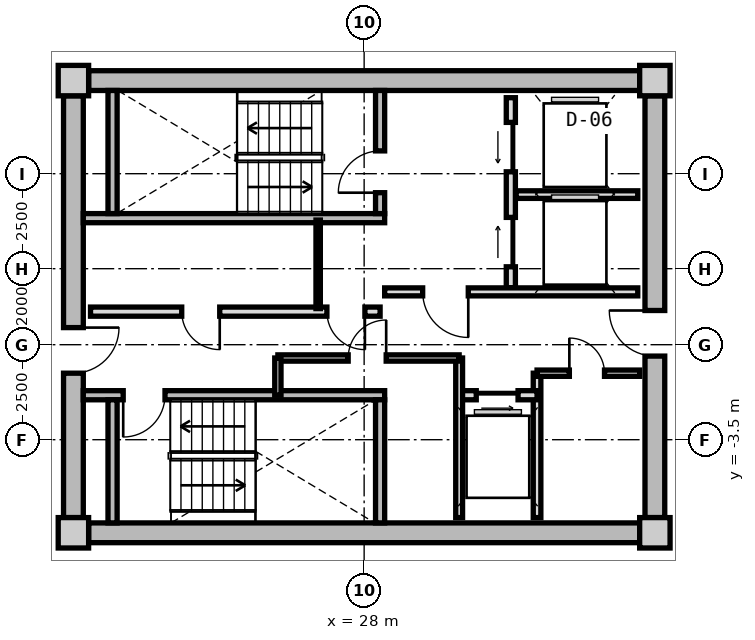
"""IFC4 building model, lengths in metres.
Left out: names, types, materials, properties, quantities, classifications, styles, units other than length and angle.
Written with IfcOpenShell. Run it as: python <this file> out.ifc"""

import sys

from ifc_helpers import new_model, si_unit, direction, frame, frame_2d, origin, origin_2d, place, context, subcontext, project, spatial, rectangle, extrude, source, transform, mapped, element, fill, save


model = new_model("IFC4")
c1 = context("Model", 3, precision=1e-05, world=origin(), true_north=direction((0.0, 1.0)))
c2 = subcontext(c1, "Body", "Model", "MODEL_VIEW")
j1 = project(units=[si_unit("LENGTHUNIT", "METRE"), si_unit("PLANEANGLEUNIT", "RADIAN")], contexts=[c1])
p1 = place(None, origin())
s1 = spatial("IfcSite", under=j1, at=p1, CompositionType="ELEMENT")
p2 = place(p1, origin())
s2 = spatial("IfcBuilding", under=s1, at=p2, CompositionType="ELEMENT")
p3 = place(p2, frame((0.0, 0.0, 235.25)))
s3 = spatial("IfcBuildingStorey", under=s2, at=p3, CompositionType="ELEMENT", Elevation=235.25)
m1 = source(origin(), c2, "Body", "SweptSolid", [
    extrude(rectangle(XDim=0.8, YDim=0.8, at=origin_2d()), origin(), (0.0, 0.0, 1.0), 3.05),
])
for number, where, z_axis, x_axis in (
    (1, (20.35, -5.95, 0.0), (0.0, 0.0, 1.0), (1.0, 0.0, 0.0)),
    (2, (35.65, -5.95, 0.0), (0.0, 0.0, 1.0), (1.0, 0.0, 0.0)),
    (3, (35.65, 5.95, 0.0), (0.0, 0.0, 1.0), (1.0, 0.0, 0.0)),
    (4, (20.35, 5.95, 0.0), (0.0, 0.0, 1.0), (1.0, 0.0, 0.0)),
):
    element("IfcColumn", number, at=place(p3, frame(where, z_axis=z_axis, x_axis=x_axis)), inside=s3, PredefinedType="COLUMN", context=c2, shape_type="MappedRepresentation", body=[
        mapped(m1, transform((0.0, 0.0, 0.0), x_axis=(1.0, 0.0, 0.0), y_axis=(0.0, 1.0, 0.0), z_axis=(0.0, 0.0, 1.0), scale=1.0)),
    ])
m2 = source(origin(), c2, "Body", "SweptSolid", [
    extrude(rectangle(XDim=14.5, YDim=0.52, at=frame_2d((7.25, 0.0))), origin(), (0.0, 0.0, 1.0), 2.81),
])
for number, where, z_axis, x_axis in (
    (5, (20.75, 5.95, 0.0), (0.0, 0.0, 1.0), (1.0, 0.0, 0.0)),
    (6, (35.25, -5.95, 0.0), (0.0, 0.0, 1.0), (-1.0, 0.0, 0.0)),
):
    element("IfcWall", number, at=place(p3, frame(where, z_axis=z_axis, x_axis=x_axis)), inside=s3, PredefinedType="SHEAR", context=c2, shape_type="MappedRepresentation", body=[
        mapped(m2, transform((0.0, 0.0, 0.0), x_axis=(1.0, 0.0, 0.0), y_axis=(0.0, 1.0, 0.0), z_axis=(0.0, 0.0, 1.0), scale=1.0)),
    ])
m3 = source(origin(), c2, "Body", "SweptSolid", [
    extrude(rectangle(XDim=11.1, YDim=0.52, at=frame_2d((5.55, 0.0))), origin(), (0.0, 0.0, 1.0), 2.81),
])
p4 = place(p3, frame((20.35, -5.55, 0.0), z_axis=(0.0, 0.0, 1.0), x_axis=(0.0, 1.0, 0.0)))
e7 = element("IfcWall", 7, at=p4, inside=s3, PredefinedType="SHEAR", context=c2, shape_type="MappedRepresentation", body=[
    mapped(m3, transform((0.0, 0.0, 0.0), x_axis=(1.0, 0.0, 0.0), y_axis=(0.0, 1.0, 0.0), z_axis=(0.0, 0.0, 1.0), scale=1.0)),
])
p5 = place(p4, frame((3.8, 0.0, 0.0)))
e8 = element("IfcOpeningElement", 8, at=p5, cuts=e7, PredefinedType="OPENING", context=c2, shape_type="SweptSolid", body=[
    extrude(rectangle(XDim=1.2, YDim=2.15, at=frame_2d((0.6, 1.075))), frame((0.0, 0.27, 0.0), z_axis=(0.0, -1.0, 0.0), x_axis=(1.0, 0.0, 0.0)), (0.0, 0.0, 1.0), 0.54),
])
p6 = place(p3, frame((35.65, 5.55, 0.0), z_axis=(0.0, 0.0, 1.0), x_axis=(0.0, -1.0, 0.0)))
e9 = element("IfcWall", 9, at=p6, inside=s3, PredefinedType="SHEAR", context=c2, shape_type="MappedRepresentation", body=[
    mapped(m3, transform((0.0, 0.0, 0.0), x_axis=(1.0, 0.0, 0.0), y_axis=(0.0, 1.0, 0.0), z_axis=(0.0, 0.0, 1.0), scale=1.0)),
])
p7 = place(p6, frame((5.65, 0.0, 0.0)))
e10 = element("IfcOpeningElement", 10, at=p7, cuts=e9, PredefinedType="OPENING", context=c2, shape_type="SweptSolid", body=[
    extrude(rectangle(XDim=1.2, YDim=2.15, at=frame_2d((0.6, 1.075))), frame((0.0, 0.27, 0.0), z_axis=(0.0, -1.0, 0.0), x_axis=(1.0, 0.0, 0.0)), (0.0, 0.0, 1.0), 0.54),
])
m4 = source(origin(), c2, "Body", "SweptSolid", [
    extrude(rectangle(XDim=7.93, YDim=0.24, at=frame_2d((3.965, 0.0))), origin(), (0.0, 0.0, 1.0), 2.81),
])
p8 = place(p3, frame((20.61, 2.33, 0.0), z_axis=(0.0, 0.0, 1.0), x_axis=(1.0, 0.0, 0.0)))
e11 = element("IfcWall", 11, at=p8, inside=s3, PredefinedType="PARTITIONING", context=c2, shape_type="MappedRepresentation", body=[
    mapped(m4, transform((0.0, 0.0, 0.0), x_axis=(1.0, 0.0, 0.0), y_axis=(0.0, 1.0, 0.0), z_axis=(0.0, 0.0, 1.0), scale=1.0)),
])
m5 = source(origin(), c2, "Body", "SweptSolid", [
    extrude(rectangle(XDim=3.24, YDim=0.24, at=frame_2d((1.62, 0.0))), origin(), (0.0, 0.0, 1.0), 2.81),
])
p9 = place(p3, frame((21.38, 2.45, 0.0), z_axis=(0.0, 0.0, 1.0), x_axis=(0.0, 1.0, 0.0)))
e12 = element("IfcWall", 12, at=p9, inside=s3, PredefinedType="PARTITIONING", context=c2, shape_type="MappedRepresentation", body=[
    mapped(m5, transform((0.0, 0.0, 0.0), x_axis=(1.0, 0.0, 0.0), y_axis=(0.0, 1.0, 0.0), z_axis=(0.0, 0.0, 1.0), scale=1.0)),
])
p10 = place(p3, frame((28.42, 2.45, 0.0), z_axis=(0.0, 0.0, 1.0), x_axis=(0.0, 1.0, 0.0)))
e13 = element("IfcWall", 13, at=p10, inside=s3, PredefinedType="PARTITIONING", context=c2, shape_type="MappedRepresentation", body=[
    mapped(m5, transform((0.0, 0.0, 0.0), x_axis=(1.0, 0.0, 0.0), y_axis=(0.0, 1.0, 0.0), z_axis=(0.0, 0.0, 1.0), scale=1.0)),
])
p11 = place(p10, frame((0.55, 0.0, 0.0)))
e14 = element("IfcOpeningElement", 14, at=p11, cuts=e13, PredefinedType="OPENING", context=c2, shape_type="SweptSolid", body=[
    extrude(rectangle(XDim=1.1, YDim=2.15, at=frame_2d((0.55, 1.075))), frame((0.0, 0.13, 0.0), z_axis=(0.0, -1.0, 0.0), x_axis=(1.0, 0.0, 0.0)), (0.0, 0.0, 1.0), 0.26),
])
p12 = place(p3, frame((20.61, -2.33, 0.0), z_axis=(0.0, 0.0, 1.0), x_axis=(1.0, 0.0, 0.0)))
e15 = element("IfcWall", 15, at=p12, inside=s3, PredefinedType="PARTITIONING", context=c2, shape_type="MappedRepresentation", body=[
    mapped(m4, transform((0.0, 0.0, 0.0), x_axis=(1.0, 0.0, 0.0), y_axis=(0.0, 1.0, 0.0), z_axis=(0.0, 0.0, 1.0), scale=1.0)),
])
p13 = place(p12, frame((1.05, 0.0, 0.0)))
e16 = element("IfcOpeningElement", 16, at=p13, cuts=e15, PredefinedType="OPENING", context=c2, shape_type="SweptSolid", body=[
    extrude(rectangle(XDim=1.1, YDim=2.15, at=frame_2d((0.55, 1.075))), frame((0.0, 0.13, 0.0), z_axis=(0.0, -1.0, 0.0), x_axis=(1.0, 0.0, 0.0)), (0.0, 0.0, 1.0), 0.26),
])
for number, where, z_axis, x_axis in (
    (17, (21.38, -5.69, 0.0), (0.0, 0.0, 1.0), (0.0, 1.0, 0.0)),
    (18, (28.42, -5.69, 0.0), (0.0, 0.0, 1.0), (0.0, 1.0, 0.0)),
):
    element("IfcWall", number, at=place(p3, frame(where, z_axis=z_axis, x_axis=x_axis)), inside=s3, PredefinedType="PARTITIONING", context=c2, shape_type="MappedRepresentation", body=[
        mapped(m5, transform((0.0, 0.0, 0.0), x_axis=(1.0, 0.0, 0.0), y_axis=(0.0, 1.0, 0.0), z_axis=(0.0, 0.0, 1.0), scale=1.0)),
    ])
m6 = source(origin(), c2, "Body", "SweptSolid", [
    extrude(rectangle(XDim=5.0, YDim=0.24, at=frame_2d((2.5, 0.0))), origin(), (0.0, 0.0, 1.0), 2.795),
])
p14 = place(p3, frame((31.86, 0.5, 0.0), z_axis=(0.0, 0.0, 1.0), x_axis=(0.0, 1.0, 0.0)))
e19 = element("IfcWall", 19, at=p14, inside=s3, PredefinedType="PARTITIONING", context=c2, shape_type="MappedRepresentation", body=[
    mapped(m6, transform((0.0, 0.0, 0.0), x_axis=(1.0, 0.0, 0.0), y_axis=(0.0, 1.0, 0.0), z_axis=(0.0, 0.0, 1.0), scale=1.0)),
])
p15 = place(p14, frame((3.05, 0.0, 0.0)))
e20 = element("IfcOpeningElement", 20, at=p15, cuts=e19, PredefinedType="OPENING", context=c2, shape_type="SweptSolid", body=[
    extrude(rectangle(XDim=1.3, YDim=2.2, at=frame_2d((0.65, 1.1))), frame((0.0, 0.13, 0.0), z_axis=(0.0, -1.0, 0.0), x_axis=(1.0, 0.0, 0.0)), (0.0, 0.0, 1.0), 0.26),
])
p16 = place(p14, frame((0.55, 0.0, 0.0)))
e21 = element("IfcOpeningElement", 21, at=p16, cuts=e19, PredefinedType="OPENING", context=c2, shape_type="SweptSolid", body=[
    extrude(rectangle(XDim=1.3, YDim=2.2, at=frame_2d((0.65, 1.1))), frame((0.0, 0.13, 0.0), z_axis=(0.0, -1.0, 0.0), x_axis=(1.0, 0.0, 0.0)), (0.0, 0.0, 1.0), 0.26),
])
m7 = source(origin(), c2, "Body", "SweptSolid", [
    extrude(rectangle(XDim=3.2, YDim=0.2, at=frame_2d((1.6, 0.0))), origin(), (0.0, 0.0, 1.0), 2.795),
])
p17 = place(p3, frame((32.0, 2.95, 0.0), z_axis=(0.0, 0.0, 1.0), x_axis=(1.0, 0.0, 0.0)))
e22 = element("IfcWall", 22, at=p17, inside=s3, PredefinedType="PARTITIONING", context=c2, shape_type="MappedRepresentation", body=[
    mapped(m7, transform((0.0, 0.0, 0.0), x_axis=(1.0, 0.0, 0.0), y_axis=(0.0, 1.0, 0.0), z_axis=(0.0, 0.0, 1.0), scale=1.0)),
])
m8 = source(origin(), c2, "Body", "SweptSolid", [
    extrude(rectangle(XDim=6.66, YDim=0.21, at=frame_2d((3.33, 0.0))), origin(), (0.0, 0.0, 1.0), 2.795),
])
p18 = place(p3, frame((28.54, 0.39, 0.0), z_axis=(0.0, 0.0, 1.0), x_axis=(1.0, 0.0, 0.0)))
e23 = element("IfcWall", 23, at=p18, inside=s3, PredefinedType="PARTITIONING", context=c2, shape_type="MappedRepresentation", body=[
    mapped(m8, transform((0.0, 0.0, 0.0), x_axis=(1.0, 0.0, 0.0), y_axis=(0.0, 1.0, 0.0), z_axis=(0.0, 0.0, 1.0), scale=1.0)),
])
p19 = place(p18, frame((1.0, 0.0, 0.0)))
e24 = element("IfcOpeningElement", 24, at=p19, cuts=e23, PredefinedType="OPENING", context=c2, shape_type="SweptSolid", body=[
    extrude(rectangle(XDim=1.2, YDim=2.15, at=frame_2d((0.6, 1.075))), frame((0.0, 0.115, 0.0), z_axis=(0.0, -1.0, 0.0), x_axis=(1.0, 0.0, 0.0)), (0.0, 0.0, 1.0), 0.23),
])
m9 = source(origin(), c2, "Body", "SweptSolid", [
    extrude(rectangle(XDim=7.62, YDim=0.24, at=frame_2d((3.81, 0.0))), origin(), (0.0, 0.0, 1.0), 2.795),
])
p20 = place(p3, frame((20.8, -0.13, 0.0), z_axis=(0.0, 0.0, 1.0), x_axis=(1.0, 0.0, 0.0)))
e25 = element("IfcWall", 25, at=p20, inside=s3, PredefinedType="PARTITIONING", context=c2, shape_type="MappedRepresentation", body=[
    mapped(m9, transform((0.0, 0.0, 0.0), x_axis=(1.0, 0.0, 0.0), y_axis=(0.0, 1.0, 0.0), z_axis=(0.0, 0.0, 1.0), scale=1.0)),
])
p21 = place(p20, frame((6.22, 0.0, 0.0)))
e26 = element("IfcOpeningElement", 26, at=p21, cuts=e25, PredefinedType="OPENING", context=c2, shape_type="SweptSolid", body=[
    extrude(rectangle(XDim=1.0, YDim=2.1, at=frame_2d((0.5, 1.05))), frame((0.0, 0.13, 0.0), z_axis=(0.0, -1.0, 0.0), x_axis=(1.0, 0.0, 0.0)), (0.0, 0.0, 1.0), 0.26),
])
p22 = place(p20, frame((2.4, 0.0, 0.0)))
e27 = element("IfcOpeningElement", 27, at=p22, cuts=e25, PredefinedType="OPENING", context=c2, shape_type="SweptSolid", body=[
    extrude(rectangle(XDim=1.0, YDim=2.1, at=frame_2d((0.5, 1.05))), frame((0.0, 0.13, 0.0), z_axis=(0.0, -1.0, 0.0), x_axis=(1.0, 0.0, 0.0)), (0.0, 0.0, 1.0), 0.26),
])
m10 = source(origin(), c2, "Body", "SweptSolid", [
    extrude(rectangle(XDim=2.33, YDim=0.115, at=frame_2d((1.165, 0.0))), origin(), (0.0, 0.0, 1.0), 2.795),
])
p23 = place(p3, frame((26.79, -0.05, 0.0), z_axis=(0.0, 0.0, 1.0), x_axis=(0.0, 1.0, 0.0)))
e28 = element("IfcWall", 28, at=p23, inside=s3, PredefinedType="PARTITIONING", context=c2, shape_type="MappedRepresentation", body=[
    mapped(m10, transform((0.0, 0.0, 0.0), x_axis=(1.0, 0.0, 0.0), y_axis=(0.0, 1.0, 0.0), z_axis=(0.0, 0.0, 1.0), scale=1.0)),
])
m11 = source(origin(), c2, "Body", "SweptSolid", [
    extrude(rectangle(XDim=3.8, YDim=0.2, at=frame_2d((1.9, 0.0))), origin(), (0.0, 0.0, 1.0), 2.795),
])
p24 = place(p3, frame((32.55, -5.55, 0.0), z_axis=(0.0, 0.0, 1.0), x_axis=(0.0, 1.0, 0.0)))
e29 = element("IfcWall", 29, at=p24, inside=s3, PredefinedType="PARTITIONING", context=c2, shape_type="MappedRepresentation", body=[
    mapped(m11, transform((0.0, 0.0, 0.0), x_axis=(1.0, 0.0, 0.0), y_axis=(0.0, 1.0, 0.0), z_axis=(0.0, 0.0, 1.0), scale=1.0)),
])
m12 = source(origin(), c2, "Body", "SweptSolid", [
    extrude(rectangle(XDim=2.05, YDim=0.24, at=frame_2d((1.025, 0.0))), origin(), (0.0, 0.0, 1.0), 2.795),
])
p25 = place(p3, frame((30.5, -2.33, 0.0), z_axis=(0.0, 0.0, 1.0), x_axis=(1.0, 0.0, 0.0)))
e30 = element("IfcWall", 30, at=p25, inside=s3, PredefinedType="PARTITIONING", context=c2, shape_type="MappedRepresentation", body=[
    mapped(m12, transform((0.0, 0.0, 0.0), x_axis=(1.0, 0.0, 0.0), y_axis=(0.0, 1.0, 0.0), z_axis=(0.0, 0.0, 1.0), scale=1.0)),
])
p26 = place(p25, frame((0.45, 0.0, 0.0)))
e31 = element("IfcOpeningElement", 31, at=p26, cuts=e30, PredefinedType="OPENING", context=c2, shape_type="SweptSolid", body=[
    extrude(rectangle(XDim=1.1, YDim=2.2, at=frame_2d((0.55, 1.1))), frame((0.0, 0.13, 0.0), z_axis=(0.0, -1.0, 0.0), x_axis=(1.0, 0.0, 0.0)), (0.0, 0.0, 1.0), 0.26),
])
m13 = source(origin(), c2, "Body", "SweptSolid", [
    extrude(rectangle(XDim=4.2, YDim=0.18, at=frame_2d((2.1, 0.0))), origin(), (0.0, 0.0, 1.0), 2.795),
])
p27 = place(p3, frame((30.5, -5.55, 0.0), z_axis=(0.0, 0.0, 1.0), x_axis=(0.0, 1.0, 0.0)))
e32 = element("IfcWall", 32, at=p27, inside=s3, PredefinedType="PARTITIONING", context=c2, shape_type="MappedRepresentation", body=[
    mapped(m13, transform((0.0, 0.0, 0.0), x_axis=(1.0, 0.0, 0.0), y_axis=(0.0, 1.0, 0.0), z_axis=(0.0, 0.0, 1.0), scale=1.0)),
])
m14 = source(origin(), c2, "Body", "SweptSolid", [
    extrude(rectangle(XDim=4.77, YDim=0.165, at=frame_2d((2.385, 0.0))), origin(), (0.0, 0.0, 1.0), 2.795),
])
p28 = place(p3, frame((25.73, -1.35, 0.0), z_axis=(0.0, 0.0, 1.0), x_axis=(1.0, 0.0, 0.0)))
e33 = element("IfcWall", 33, at=p28, inside=s3, PredefinedType="PARTITIONING", context=c2, shape_type="MappedRepresentation", body=[
    mapped(m14, transform((0.0, 0.0, 0.0), x_axis=(1.0, 0.0, 0.0), y_axis=(0.0, 1.0, 0.0), z_axis=(0.0, 0.0, 1.0), scale=1.0)),
])
p29 = place(p28, frame((1.85, 0.0, 0.0)))
e34 = element("IfcOpeningElement", 34, at=p29, cuts=e33, PredefinedType="OPENING", context=c2, shape_type="SweptSolid", body=[
    extrude(rectangle(XDim=1.0, YDim=2.1, at=frame_2d((0.5, 1.05))), frame((0.0, 0.093, 0.0), z_axis=(0.0, -1.0, 0.0), x_axis=(1.0, 0.0, 0.0)), (0.0, 0.0, 1.0), 0.185),
])
m15 = source(origin(), c2, "Body", "SweptSolid", [
    extrude(rectangle(XDim=0.98, YDim=0.165, at=frame_2d((0.49, 0.0))), origin(), (0.0, 0.0, 1.0), 2.795),
])
p30 = place(p3, frame((25.73, -2.33, 0.0), z_axis=(0.0, 0.0, 1.0), x_axis=(0.0, 1.0, 0.0)))
e35 = element("IfcWall", 35, at=p30, inside=s3, PredefinedType="PARTITIONING", context=c2, shape_type="MappedRepresentation", body=[
    mapped(m15, transform((0.0, 0.0, 0.0), x_axis=(1.0, 0.0, 0.0), y_axis=(0.0, 1.0, 0.0), z_axis=(0.0, 0.0, 1.0), scale=1.0)),
])
m16 = source(origin(), c2, "Body", "SweptSolid", [
    extrude(rectangle(XDim=2.7, YDim=0.165, at=frame_2d((1.35, 0.0))), origin(), (0.0, 0.0, 1.0), 2.795),
])
p31 = place(p3, frame((32.55, -1.75, 0.0), z_axis=(0.0, 0.0, 1.0), x_axis=(1.0, 0.0, 0.0)))
e36 = element("IfcWall", 36, at=p31, inside=s3, PredefinedType="PARTITIONING", context=c2, shape_type="MappedRepresentation", body=[
    mapped(m16, transform((0.0, 0.0, 0.0), x_axis=(1.0, 0.0, 0.0), y_axis=(0.0, 1.0, 0.0), z_axis=(0.0, 0.0, 1.0), scale=1.0)),
])
p32 = place(p31, frame((0.85, 0.0, 0.0)))
e37 = element("IfcOpeningElement", 37, at=p32, cuts=e36, PredefinedType="OPENING", context=c2, shape_type="SweptSolid", body=[
    extrude(rectangle(XDim=0.925, YDim=2.1, at=frame_2d((0.462, 1.05))), frame((0.0, 0.093, 0.0), z_axis=(0.0, -1.0, 0.0), x_axis=(1.0, 0.0, 0.0)), (0.0, 0.0, 1.0), 0.185),
])
m17 = source(origin(), c2, "Body", "SweptSolid", [
    extrude(rectangle(XDim=1.1, YDim=2.15, at=frame_2d((0.55, 1.075))), frame((0.0, 0.025, 0.0), z_axis=(0.0, -1.0, 0.0), x_axis=(1.0, 0.0, 0.0)), (0.0, 0.0, 1.0), 0.05),
])
p33 = place(p11, origin())
e38 = element("IfcDoor", 38, at=p33, inside=s3, OperationType="SINGLE_SWING_LEFT", PredefinedType="DOOR", context=c2, shape_type="MappedRepresentation", body=[
    mapped(m17, transform((0.0, 0.0, 0.0), x_axis=(1.0, 0.0, 0.0), y_axis=(0.0, 1.0, 0.0), z_axis=(0.0, 0.0, 1.0), scale=1.0)),
])
fill(e14, e38)
p34 = place(p13, frame((1.1, 0.0, 0.0), z_axis=(0.0, 0.0, 1.0), x_axis=(-1.0, 0.0, 0.0)))
e39 = element("IfcDoor", 39, at=p34, inside=s3, OperationType="SINGLE_SWING_RIGHT", PredefinedType="DOOR", context=c2, shape_type="MappedRepresentation", body=[
    mapped(m17, transform((0.0, 0.0, 0.0), x_axis=(1.0, 0.0, 0.0), y_axis=(0.0, 1.0, 0.0), z_axis=(0.0, 0.0, 1.0), scale=1.0)),
])
fill(e16, e39)
m18 = source(origin(), c2, "Body", "SweptSolid", [
    extrude(rectangle(XDim=1.3, YDim=2.2, at=frame_2d((0.65, 1.1))), frame((0.0, 0.025, 0.0), z_axis=(0.0, -1.0, 0.0), x_axis=(1.0, 0.0, 0.0)), (0.0, 0.0, 1.0), 0.05),
])
p35 = place(p15, origin())
e40 = element("IfcDoor", 40, at=p35, inside=s3, OperationType="SLIDING_TO_LEFT", PredefinedType="DOOR", context=c2, shape_type="MappedRepresentation", body=[
    mapped(m18, transform((0.0, 0.0, 0.0), x_axis=(1.0, 0.0, 0.0), y_axis=(0.0, 1.0, 0.0), z_axis=(0.0, 0.0, 1.0), scale=1.0)),
])
fill(e20, e40)
p36 = place(p16, origin())
e41 = element("IfcDoor", 41, at=p36, inside=s3, OperationType="SLIDING_TO_RIGHT", PredefinedType="DOOR", context=c2, shape_type="MappedRepresentation", body=[
    mapped(m18, transform((0.0, 0.0, 0.0), x_axis=(1.0, 0.0, 0.0), y_axis=(0.0, 1.0, 0.0), z_axis=(0.0, 0.0, 1.0), scale=1.0)),
])
fill(e21, e41)
m19 = source(origin(), c2, "Body", "SweptSolid", [
    extrude(rectangle(XDim=1.2, YDim=2.15, at=frame_2d((0.6, 1.075))), frame((0.0, 0.025, 0.0), z_axis=(0.0, -1.0, 0.0), x_axis=(1.0, 0.0, 0.0)), (0.0, 0.0, 1.0), 0.05),
])
p37 = place(p19, frame((1.2, 0.0, 0.0), z_axis=(0.0, 0.0, 1.0), x_axis=(-1.0, 0.0, 0.0)))
e42 = element("IfcDoor", 42, at=p37, inside=s3, OperationType="SINGLE_SWING_LEFT", PredefinedType="DOOR", context=c2, shape_type="MappedRepresentation", body=[
    mapped(m19, transform((0.0, 0.0, 0.0), x_axis=(1.0, 0.0, 0.0), y_axis=(0.0, 1.0, 0.0), z_axis=(0.0, 0.0, 1.0), scale=1.0)),
])
fill(e24, e42)
p38 = place(p5, frame((1.2, 0.0, 0.0), z_axis=(0.0, 0.0, 1.0), x_axis=(-1.0, 0.0, 0.0)))
e43 = element("IfcDoor", 43, at=p38, inside=s3, OperationType="SINGLE_SWING_LEFT", PredefinedType="DOOR", context=c2, shape_type="MappedRepresentation", body=[
    mapped(m19, transform((0.0, 0.0, 0.0), x_axis=(1.0, 0.0, 0.0), y_axis=(0.0, 1.0, 0.0), z_axis=(0.0, 0.0, 1.0), scale=1.0)),
])
fill(e8, e43)
p39 = place(p7, frame((1.2, 0.0, 0.0), z_axis=(0.0, 0.0, 1.0), x_axis=(-1.0, 0.0, 0.0)))
e44 = element("IfcDoor", 44, at=p39, inside=s3, OperationType="SINGLE_SWING_RIGHT", PredefinedType="DOOR", context=c2, shape_type="MappedRepresentation", body=[
    mapped(m19, transform((0.0, 0.0, 0.0), x_axis=(1.0, 0.0, 0.0), y_axis=(0.0, 1.0, 0.0), z_axis=(0.0, 0.0, 1.0), scale=1.0)),
])
fill(e10, e44)
m20 = source(origin(), c2, "Body", "SweptSolid", [
    extrude(rectangle(XDim=1.0, YDim=2.1, at=frame_2d((0.5, 1.05))), frame((0.0, 0.025, 0.0), z_axis=(0.0, -1.0, 0.0), x_axis=(1.0, 0.0, 0.0)), (0.0, 0.0, 1.0), 0.05),
])
p40 = place(p21, frame((1.0, 0.0, 0.0), z_axis=(0.0, 0.0, 1.0), x_axis=(-1.0, 0.0, 0.0)))
e45 = element("IfcDoor", 45, at=p40, inside=s3, OperationType="SINGLE_SWING_LEFT", PredefinedType="DOOR", context=c2, shape_type="MappedRepresentation", body=[
    mapped(m20, transform((0.0, 0.0, 0.0), x_axis=(1.0, 0.0, 0.0), y_axis=(0.0, 1.0, 0.0), z_axis=(0.0, 0.0, 1.0), scale=1.0)),
])
fill(e26, e45)
p41 = place(p22, frame((1.0, 0.0, 0.0), z_axis=(0.0, 0.0, 1.0), x_axis=(-1.0, 0.0, 0.0)))
e46 = element("IfcDoor", 46, at=p41, inside=s3, OperationType="SINGLE_SWING_LEFT", PredefinedType="DOOR", context=c2, shape_type="MappedRepresentation", body=[
    mapped(m20, transform((0.0, 0.0, 0.0), x_axis=(1.0, 0.0, 0.0), y_axis=(0.0, 1.0, 0.0), z_axis=(0.0, 0.0, 1.0), scale=1.0)),
])
fill(e27, e46)
m21 = source(origin(), c2, "Body", "SweptSolid", [
    extrude(rectangle(XDim=1.1, YDim=2.2, at=frame_2d((0.55, 1.1))), frame((0.0, 0.025, 0.0), z_axis=(0.0, -1.0, 0.0), x_axis=(1.0, 0.0, 0.0)), (0.0, 0.0, 1.0), 0.05),
])
p42 = place(p26, frame((1.1, 0.0, 0.0), z_axis=(0.0, 0.0, 1.0), x_axis=(-1.0, 0.0, 0.0)))
e47 = element("IfcDoor", 47, at=p42, inside=s3, OperationType="SLIDING_TO_RIGHT", PredefinedType="DOOR", context=c2, shape_type="MappedRepresentation", body=[
    mapped(m21, transform((0.0, 0.0, 0.0), x_axis=(1.0, 0.0, 0.0), y_axis=(0.0, 1.0, 0.0), z_axis=(0.0, 0.0, 1.0), scale=1.0)),
])
fill(e31, e47)
p43 = place(p29, origin())
e48 = element("IfcDoor", 48, at=p43, inside=s3, OperationType="SINGLE_SWING_RIGHT", PredefinedType="DOOR", context=c2, shape_type="MappedRepresentation", body=[
    mapped(m20, transform((0.0, 0.0, 0.0), x_axis=(1.0, 0.0, 0.0), y_axis=(0.0, 1.0, 0.0), z_axis=(0.0, 0.0, 1.0), scale=1.0)),
])
fill(e34, e48)
m22 = source(origin(), c2, "Body", "SweptSolid", [
    extrude(rectangle(XDim=0.925, YDim=2.1, at=frame_2d((0.462, 1.05))), frame((0.0, 0.025, 0.0), z_axis=(0.0, -1.0, 0.0), x_axis=(1.0, 0.0, 0.0)), (0.0, 0.0, 1.0), 0.05),
])
p44 = place(p32, origin())
e49 = element("IfcDoor", 49, at=p44, inside=s3, OperationType="SINGLE_SWING_LEFT", PredefinedType="DOOR", context=c2, shape_type="MappedRepresentation", body=[
    mapped(m22, transform((0.0, 0.0, 0.0), x_axis=(1.0, 0.0, 0.0), y_axis=(0.0, 1.0, 0.0), z_axis=(0.0, 0.0, 1.0), scale=1.0)),
])
fill(e37, e49)
save(model, sys.argv[1])
